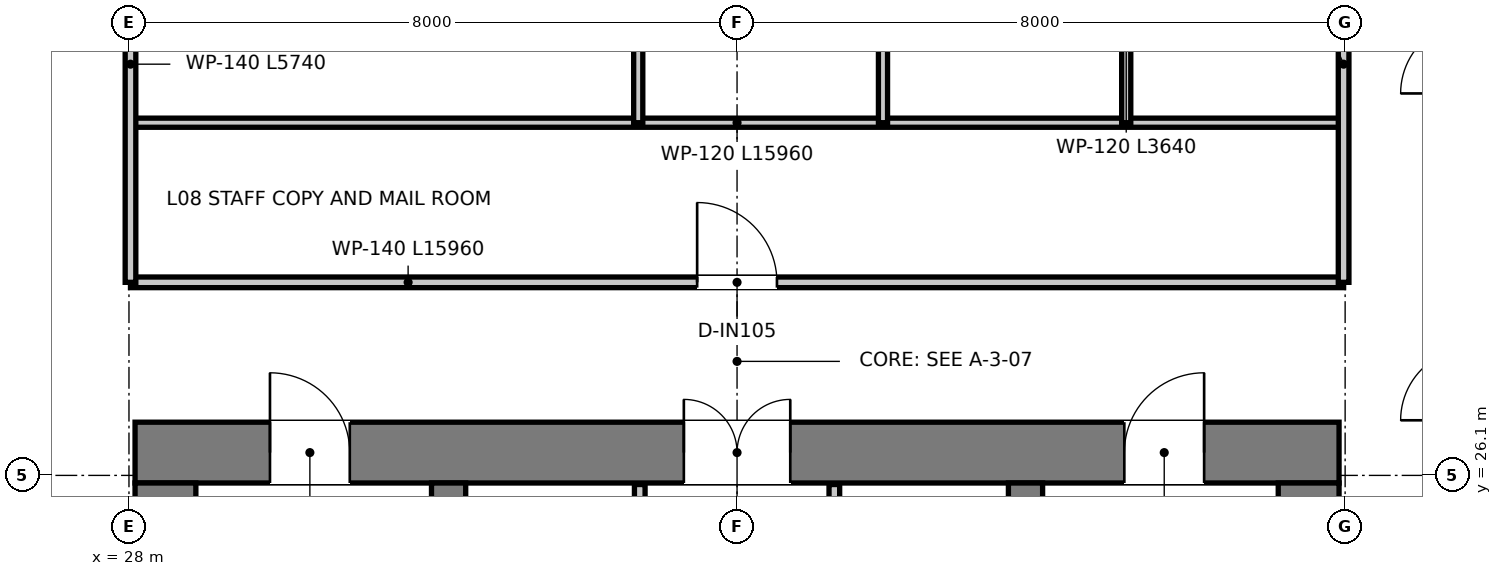
"""IFC4 building model, lengths in metres.
Left out: names, types, materials, properties, quantities, classifications, styles, units other than length and angle.
Written with IfcOpenShell. Run it as: python <this file> out.ifc"""

import sys

from ifc_helpers import new_model, si_unit, direction, frame, frame_2d, origin, place, context, subcontext, project, spatial, rectangle, extrude, element, fill, save


model = new_model("IFC4")
c1 = context("Model", 3, precision=1e-05, world=origin(), true_north=direction((0.0, 1.0)))
c2 = subcontext(c1, "Body", "Model", "MODEL_VIEW")
j1 = project(units=[si_unit("LENGTHUNIT", "METRE"), si_unit("PLANEANGLEUNIT", "RADIAN")], contexts=[c1])
p1 = place(None, origin())
s1 = spatial("IfcSite", under=j1, at=p1, CompositionType="ELEMENT")
p2 = place(p1, origin())
s2 = spatial("IfcBuilding", under=s1, at=p2, CompositionType="ELEMENT")
p3 = place(p2, frame((0.0, 0.0, 36.85)))
s3 = spatial("IfcBuildingStorey", under=s2, at=p3, CompositionType="ELEMENT", Elevation=36.85)
p4 = place(p3, frame((28.08, 26.4, 0.0), z_axis=(0.0, 0.0, 1.0), x_axis=(1.0, 0.0, 0.0)))
e1 = element("IfcWall", 1, at=p4, inside=s3, PredefinedType="SHEAR", context=c2, shape_type="SweptSolid", body=[
    extrude(rectangle(XDim=15.84, YDim=0.8, at=frame_2d((7.92, 0.0))), origin(), (0.0, 0.0, 1.0), 3.95),
])
p5 = place(p4, frame((7.22, 0.0, 0.0)))
e2 = element("IfcOpeningElement", 2, at=p5, cuts=e1, PredefinedType="OPENING", context=c2, shape_type="SweptSolid", body=[
    extrude(rectangle(XDim=1.4, YDim=2.2, at=frame_2d((0.7, 1.1))), frame((0.0, 0.41, 0.0), z_axis=(0.0, -1.0, 0.0), x_axis=(1.0, 0.0, 0.0)), (0.0, 0.0, 1.0), 0.82),
])
p6 = place(p4, frame((1.775, 0.0, 0.0)))
e3 = element("IfcOpeningElement", 3, at=p6, cuts=e1, PredefinedType="OPENING", context=c2, shape_type="SweptSolid", body=[
    extrude(rectangle(XDim=1.05, YDim=2.1, at=frame_2d((0.525, 1.05))), frame((0.0, 0.41, 0.0), z_axis=(0.0, -1.0, 0.0), x_axis=(1.0, 0.0, 0.0)), (0.0, 0.0, 1.0), 0.82),
])
p7 = place(p4, frame((13.015, 0.0, 0.0)))
e4 = element("IfcOpeningElement", 4, at=p7, cuts=e1, PredefinedType="OPENING", context=c2, shape_type="SweptSolid", body=[
    extrude(rectangle(XDim=1.05, YDim=2.1, at=frame_2d((0.525, 1.05))), frame((0.0, 0.41, 0.0), z_axis=(0.0, -1.0, 0.0), x_axis=(1.0, 0.0, 0.0)), (0.0, 0.0, 1.0), 0.82),
])
for number, where, z_axis, x_axis in (
    (5, (28.48, 11.3, 0.0), (0.0, 0.0, 1.0), (0.0, 1.0, 0.0)),
    (6, (43.52, 11.3, 0.0), (0.0, 0.0, 1.0), (0.0, 1.0, 0.0)),
):
    element("IfcWall", number, at=place(p3, frame(where, z_axis=z_axis, x_axis=x_axis)), inside=s3, PredefinedType="SHEAR", context=c2, shape_type="SweptSolid", body=[
        extrude(rectangle(XDim=14.7, YDim=0.8, at=frame_2d((7.35, 0.0))), origin(), (0.0, 0.0, 1.0), 3.95),
    ])
p8 = place(p3, frame((32.205, 13.22, 0.0), z_axis=(0.0, 0.0, 1.0), x_axis=(0.0, 1.0, 0.0)))
e7 = element("IfcWall", 7, at=p8, inside=s3, PredefinedType="SHEAR", context=c2, shape_type="SweptSolid", body=[
    extrude(rectangle(XDim=12.78, YDim=0.45, at=frame_2d((6.39, 0.0))), origin(), (0.0, 0.0, 1.0), 3.95),
])
p9 = place(p8, frame((10.58, 0.0, 0.0)))
e8 = element("IfcOpeningElement", 8, at=p9, cuts=e7, PredefinedType="OPENING", context=c2, shape_type="SweptSolid", body=[
    extrude(rectangle(XDim=1.1, YDim=2.15, at=frame_2d((0.55, 1.075))), frame((0.0, 0.235, 0.0), z_axis=(0.0, -1.0, 0.0), x_axis=(1.0, 0.0, 0.0)), (0.0, 0.0, 1.0), 0.47),
])
p10 = place(p3, frame((39.795, 13.22, 0.0), z_axis=(0.0, 0.0, 1.0), x_axis=(0.0, 1.0, 0.0)))
e9 = element("IfcWall", 9, at=p10, inside=s3, PredefinedType="SHEAR", context=c2, shape_type="SweptSolid", body=[
    extrude(rectangle(XDim=12.78, YDim=0.45, at=frame_2d((6.39, 0.0))), origin(), (0.0, 0.0, 1.0), 3.95),
])
p11 = place(p10, frame((10.58, 0.0, 0.0)))
e10 = element("IfcOpeningElement", 10, at=p11, cuts=e9, PredefinedType="OPENING", context=c2, shape_type="SweptSolid", body=[
    extrude(rectangle(XDim=1.1, YDim=2.15, at=frame_2d((0.55, 1.075))), frame((0.0, 0.235, 0.0), z_axis=(0.0, -1.0, 0.0), x_axis=(1.0, 0.0, 0.0)), (0.0, 0.0, 1.0), 0.47),
])
p12 = place(p3, frame((34.72, 20.2, 0.0), z_axis=(0.0, 0.0, 1.0), x_axis=(0.0, 1.0, 0.0)))
e11 = element("IfcWall", 11, at=p12, inside=s3, PredefinedType="PARTITIONING", context=c2, shape_type="SweptSolid", body=[
    extrude(rectangle(XDim=5.78, YDim=0.14, at=frame_2d((2.89, 0.0))), origin(), (0.0, 0.0, 1.0), 2.47),
])
p13 = place(p12, frame((1.05, 0.0, 0.0)))
e12 = element("IfcOpeningElement", 12, at=p13, cuts=e11, PredefinedType="OPENING", context=c2, shape_type="SweptSolid", body=[
    extrude(rectangle(XDim=0.9, YDim=2.1, at=frame_2d((0.45, 1.05))), frame((0.0, 0.08, 0.0), z_axis=(0.0, -1.0, 0.0), x_axis=(1.0, 0.0, 0.0)), (0.0, 0.0, 1.0), 0.16),
])
p14 = place(p3, frame((37.28, 20.2, 0.0), z_axis=(0.0, 0.0, 1.0), x_axis=(0.0, 1.0, 0.0)))
e13 = element("IfcWall", 13, at=p14, inside=s3, PredefinedType="PARTITIONING", context=c2, shape_type="SweptSolid", body=[
    extrude(rectangle(XDim=5.78, YDim=0.14, at=frame_2d((2.89, 0.0))), origin(), (0.0, 0.0, 1.0), 2.47),
])
p15 = place(p14, frame((0.95, 0.0, 0.0)))
e14 = element("IfcOpeningElement", 14, at=p15, cuts=e13, PredefinedType="OPENING", context=c2, shape_type="SweptSolid", body=[
    extrude(rectangle(XDim=1.1, YDim=2.15, at=frame_2d((0.55, 1.075))), frame((0.0, 0.08, 0.0), z_axis=(0.0, -1.0, 0.0), x_axis=(1.0, 0.0, 0.0)), (0.0, 0.0, 1.0), 0.16),
])
p16 = place(p3, frame((28.02, 28.64, 0.0), z_axis=(0.0, 0.0, 1.0), x_axis=(1.0, 0.0, 0.0)))
e15 = element("IfcWall", 15, at=p16, inside=s3, PredefinedType="PARTITIONING", context=c2, shape_type="SweptSolid", body=[
    extrude(rectangle(XDim=15.96, YDim=0.14, at=frame_2d((7.98, 0.0))), origin(), (0.0, 0.0, 1.0), 3.08),
])
p17 = place(p16, frame((7.455, 0.0, 0.0)))
e16 = element("IfcOpeningElement", 16, at=p17, cuts=e15, PredefinedType="OPENING", context=c2, shape_type="SweptSolid", body=[
    extrude(rectangle(XDim=1.05, YDim=2.15, at=frame_2d((0.525, 1.075))), frame((0.0, 0.08, 0.0), z_axis=(0.0, -1.0, 0.0), x_axis=(1.0, 0.0, 0.0)), (0.0, 0.0, 1.0), 0.16),
])
p18 = place(p3, frame((28.02, 30.74, 0.0), z_axis=(0.0, 0.0, 1.0), x_axis=(1.0, 0.0, 0.0)))
e17 = element("IfcWall", 17, at=p18, inside=s3, PredefinedType="PARTITIONING", context=c2, shape_type="SweptSolid", body=[
    extrude(rectangle(XDim=15.96, YDim=0.12, at=frame_2d((7.98, 0.0))), origin(), (0.0, 0.0, 1.0), 3.08),
])
for number, where, z_axis, x_axis in (
    (18, (28.02, 28.64, 0.0), (0.0, 0.0, 1.0), (0.0, 1.0, 0.0)),
    (19, (43.98, 28.64, 0.0), (0.0, 0.0, 1.0), (0.0, 1.0, 0.0)),
):
    element("IfcWall", number, at=place(p3, frame(where, z_axis=z_axis, x_axis=x_axis)), inside=s3, PredefinedType="PARTITIONING", context=c2, shape_type="SweptSolid", body=[
        extrude(rectangle(XDim=5.74, YDim=0.14, at=frame_2d((2.87, 0.0))), origin(), (0.0, 0.0, 1.0), 3.22),
    ])
for number, where, z_axis, x_axis in (
    (20, (37.92, 30.74, 0.0), (0.0, 0.0, 1.0), (0.0, 1.0, 0.0)),
    (21, (41.12, 30.74, 0.0), (0.0, 0.0, 1.0), (0.0, 1.0, 0.0)),
    (22, (34.7, 30.74, 0.0), (0.0, 0.0, 1.0), (0.0, 1.0, 0.0)),
):
    element("IfcWall", number, at=place(p3, frame(where, z_axis=z_axis, x_axis=x_axis)), inside=s3, PredefinedType="PARTITIONING", context=c2, shape_type="SweptSolid", body=[
        extrude(rectangle(XDim=3.64, YDim=0.12, at=frame_2d((1.82, 0.0))), origin(), (0.0, 0.0, 1.0), 3.12),
    ])
p19 = place(p5, origin())
e23 = element("IfcDoor", 23, at=p19, inside=s3, OperationType="DOUBLE_DOOR_SINGLE_SWING", PredefinedType="DOOR", context=c2, shape_type="SweptSolid", body=[
    extrude(rectangle(XDim=1.4, YDim=2.2, at=frame_2d((0.7, 1.1))), frame((0.0, 0.025, 0.0), z_axis=(0.0, -1.0, 0.0), x_axis=(1.0, 0.0, 0.0)), (0.0, 0.0, 1.0), 0.05),
])
fill(e2, e23)
p20 = place(p6, origin())
e24 = element("IfcDoor", 24, at=p20, inside=s3, OperationType="SINGLE_SWING_LEFT", PredefinedType="DOOR", context=c2, shape_type="SweptSolid", body=[
    extrude(rectangle(XDim=1.05, YDim=2.1, at=frame_2d((0.525, 1.05))), frame((0.0, 0.025, 0.0), z_axis=(0.0, -1.0, 0.0), x_axis=(1.0, 0.0, 0.0)), (0.0, 0.0, 1.0), 0.05),
])
fill(e3, e24)
p21 = place(p7, origin())
e25 = element("IfcDoor", 25, at=p21, inside=s3, OperationType="SINGLE_SWING_RIGHT", PredefinedType="DOOR", context=c2, shape_type="SweptSolid", body=[
    extrude(rectangle(XDim=1.05, YDim=2.1, at=frame_2d((0.525, 1.05))), frame((0.0, 0.025, 0.0), z_axis=(0.0, -1.0, 0.0), x_axis=(1.0, 0.0, 0.0)), (0.0, 0.0, 1.0), 0.05),
])
fill(e4, e25)
p22 = place(p17, origin())
e26 = element("IfcDoor", 26, at=p22, inside=s3, OperationType="SINGLE_SWING_LEFT", PredefinedType="DOOR", context=c2, shape_type="SweptSolid", body=[
    extrude(rectangle(XDim=1.05, YDim=2.15, at=frame_2d((0.525, 1.075))), frame((0.0, 0.025, 0.0), z_axis=(0.0, -1.0, 0.0), x_axis=(1.0, 0.0, 0.0)), (0.0, 0.0, 1.0), 0.05),
])
fill(e16, e26)
save(model, sys.argv[1])
